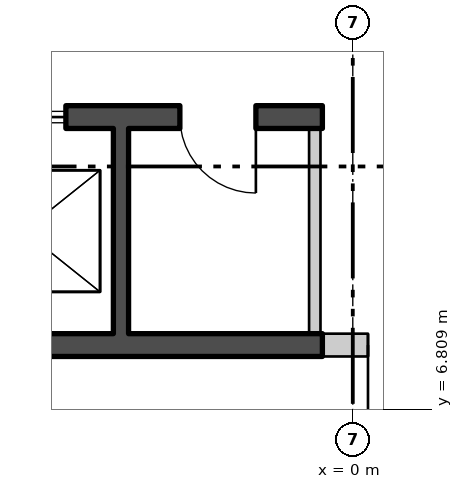
"""IFC4 building model, lengths in metres.
Left out: names, types, materials, properties, quantities, classifications, styles, units other than length and angle.
Written with IfcOpenShell. Run it as: python <this file> out.ifc"""

import sys

from ifc_helpers import new_model, si_unit, direction, frame, frame_2d, origin, place, context, subcontext, project, spatial, rectangle, extrude, element, fill, save


model = new_model("IFC4")
c1 = context("Model", 3, precision=1e-05, world=origin(), true_north=direction((0.0, 1.0)))
c2 = subcontext(c1, "Body", "Model", "MODEL_VIEW")
j1 = project(units=[si_unit("LENGTHUNIT", "METRE"), si_unit("PLANEANGLEUNIT", "RADIAN")], contexts=[c1])
p1 = place(None, origin())
s1 = spatial("IfcSite", under=j1, at=p1, CompositionType="ELEMENT")
p2 = place(p1, origin())
s2 = spatial("IfcBuilding", under=s1, at=p2, CompositionType="ELEMENT")
p3 = place(p2, frame((0.0, 0.0, 133.8)))
s3 = spatial("IfcBuildingStorey", under=s2, at=p3, CompositionType="ELEMENT", Elevation=133.8)
p4 = place(p3, frame((-10.7, 10.65, 0.0), z_axis=(0.0, 0.0, 1.0), x_axis=(1.0, 0.0, 0.0)))
e1 = element("IfcWall", 1, at=p4, inside=s3, PredefinedType="SHEAR", context=c2, shape_type="SweptSolid", body=[
    extrude(rectangle(XDim=10.3, YDim=0.3, at=frame_2d((5.15, 0.0))), origin(), (0.0, 0.0, 1.0), 5.8),
])
p5 = place(p4, frame((0.675, 0.0, 0.0)))
e2 = element("IfcOpeningElement", 2, at=p5, cuts=e1, PredefinedType="OPENING", context=c2, shape_type="SweptSolid", body=[
    extrude(rectangle(XDim=1.1, YDim=2.1, at=frame_2d((0.55, 1.05))), frame((0.0, 0.16, 0.0), z_axis=(0.0, -1.0, 0.0), x_axis=(1.0, 0.0, 0.0)), (0.0, 0.0, 1.0), 0.32),
])
p6 = place(p4, frame((3.275, 0.0, 0.0)))
e3 = element("IfcOpeningElement", 3, at=p6, cuts=e1, PredefinedType="OPENING", context=c2, shape_type="SweptSolid", body=[
    extrude(rectangle(XDim=1.1, YDim=2.1, at=frame_2d((0.55, 1.05))), frame((0.0, 0.16, 0.0), z_axis=(0.0, -1.0, 0.0), x_axis=(1.0, 0.0, 0.0)), (0.0, 0.0, 1.0), 0.32),
])
p7 = place(p4, frame((5.825, 0.0, 0.0)))
e4 = element("IfcOpeningElement", 4, at=p7, cuts=e1, PredefinedType="OPENING", context=c2, shape_type="SweptSolid", body=[
    extrude(rectangle(XDim=1.1, YDim=2.1, at=frame_2d((0.55, 1.05))), frame((0.0, 0.16, 0.0), z_axis=(0.0, -1.0, 0.0), x_axis=(1.0, 0.0, 0.0)), (0.0, 0.0, 1.0), 0.32),
])
p8 = place(p4, frame((8.425, 0.0, 0.0)))
e5 = element("IfcOpeningElement", 5, at=p8, cuts=e1, PredefinedType="OPENING", context=c2, shape_type="SweptSolid", body=[
    extrude(rectangle(XDim=1.0, YDim=2.1, at=frame_2d((0.5, 1.05))), frame((0.0, 0.16, 0.0), z_axis=(0.0, -1.0, 0.0), x_axis=(1.0, 0.0, 0.0)), (0.0, 0.0, 1.0), 0.32),
])
p9 = place(p3, frame((-10.7, 7.65, 0.0), z_axis=(0.0, 0.0, 1.0), x_axis=(1.0, 0.0, 0.0)))
e6 = element("IfcWall", 6, at=p9, inside=s3, PredefinedType="SHEAR", context=c2, shape_type="SweptSolid", body=[
    extrude(rectangle(XDim=10.3, YDim=0.3, at=frame_2d((5.15, 0.0))), origin(), (0.0, 0.0, 1.0), 5.8),
])
p10 = place(p3, frame((-3.05, 7.8, 0.0), z_axis=(0.0, 0.0, 1.0), x_axis=(0.0, 1.0, 0.0)))
e7 = element("IfcWall", 7, at=p10, inside=s3, PredefinedType="SHEAR", context=c2, shape_type="SweptSolid", body=[
    extrude(rectangle(XDim=2.7, YDim=0.2, at=frame_2d((1.35, 0.0))), origin(), (0.0, 0.0, 1.0), 5.8),
])
p11 = place(p3, frame((-0.5, 7.8, 0.0), z_axis=(0.0, 0.0, 1.0), x_axis=(0.0, 1.0, 0.0)))
e8 = element("IfcWall", 8, at=p11, inside=s3, PredefinedType="PARTITIONING", context=c2, shape_type="SweptSolid", body=[
    extrude(rectangle(XDim=2.7, YDim=0.15, at=frame_2d((1.35, 0.0))), origin(), (0.0, 0.0, 1.0), 5.8),
])
p12 = place(p3, frame((-0.4, 7.65, 0.0), z_axis=(0.0, 0.0, 1.0), x_axis=(1.0, 0.0, 0.0)))
e9 = element("IfcWall", 9, at=p12, inside=s3, PredefinedType="PARTITIONING", context=c2, shape_type="SweptSolid", body=[
    extrude(rectangle(XDim=3.0, YDim=0.3, at=frame_2d((1.5, 0.0))), origin(), (0.0, 0.0, 1.0), 5.8),
])
p13 = place(p12, frame((0.6, 0.0, 0.0)))
e10 = element("IfcOpeningElement", 10, at=p13, cuts=e9, PredefinedType="OPENING", context=c2, shape_type="SweptSolid", body=[
    extrude(rectangle(XDim=1.8, YDim=2.4, at=frame_2d((0.9, 1.2))), frame((0.0, 0.16, 0.0), z_axis=(0.0, -1.0, 0.0), x_axis=(1.0, 0.0, 0.0)), (0.0, 0.0, 1.0), 0.32),
])
p14 = place(p7, origin())
e11 = element("IfcDoor", 11, at=p14, inside=s3, OperationType="SLIDING_TO_LEFT", PredefinedType="DOOR", context=c2, shape_type="SweptSolid", body=[
    extrude(rectangle(XDim=1.1, YDim=2.1, at=frame_2d((0.55, 1.05))), frame((0.0, 0.025, 0.0), z_axis=(0.0, -1.0, 0.0), x_axis=(1.0, 0.0, 0.0)), (0.0, 0.0, 1.0), 0.05),
])
fill(e4, e11)
p15 = place(p8, origin())
e12 = element("IfcDoor", 12, at=p15, inside=s3, OperationType="SINGLE_SWING_RIGHT", PredefinedType="DOOR", context=c2, shape_type="SweptSolid", body=[
    extrude(rectangle(XDim=1.0, YDim=2.1, at=frame_2d((0.5, 1.05))), frame((0.0, 0.025, 0.0), z_axis=(0.0, -1.0, 0.0), x_axis=(1.0, 0.0, 0.0)), (0.0, 0.0, 1.0), 0.05),
])
fill(e5, e12)
p16 = place(p13, origin())
e13 = element("IfcDoor", 13, at=p16, inside=s3, OperationType="DOUBLE_DOOR_SINGLE_SWING", PredefinedType="DOOR", context=c2, shape_type="SweptSolid", body=[
    extrude(rectangle(XDim=1.8, YDim=2.4, at=frame_2d((0.9, 1.2))), frame((0.0, 0.025, 0.0), z_axis=(0.0, -1.0, 0.0), x_axis=(1.0, 0.0, 0.0)), (0.0, 0.0, 1.0), 0.05),
])
fill(e10, e13)
save(model, sys.argv[1])
